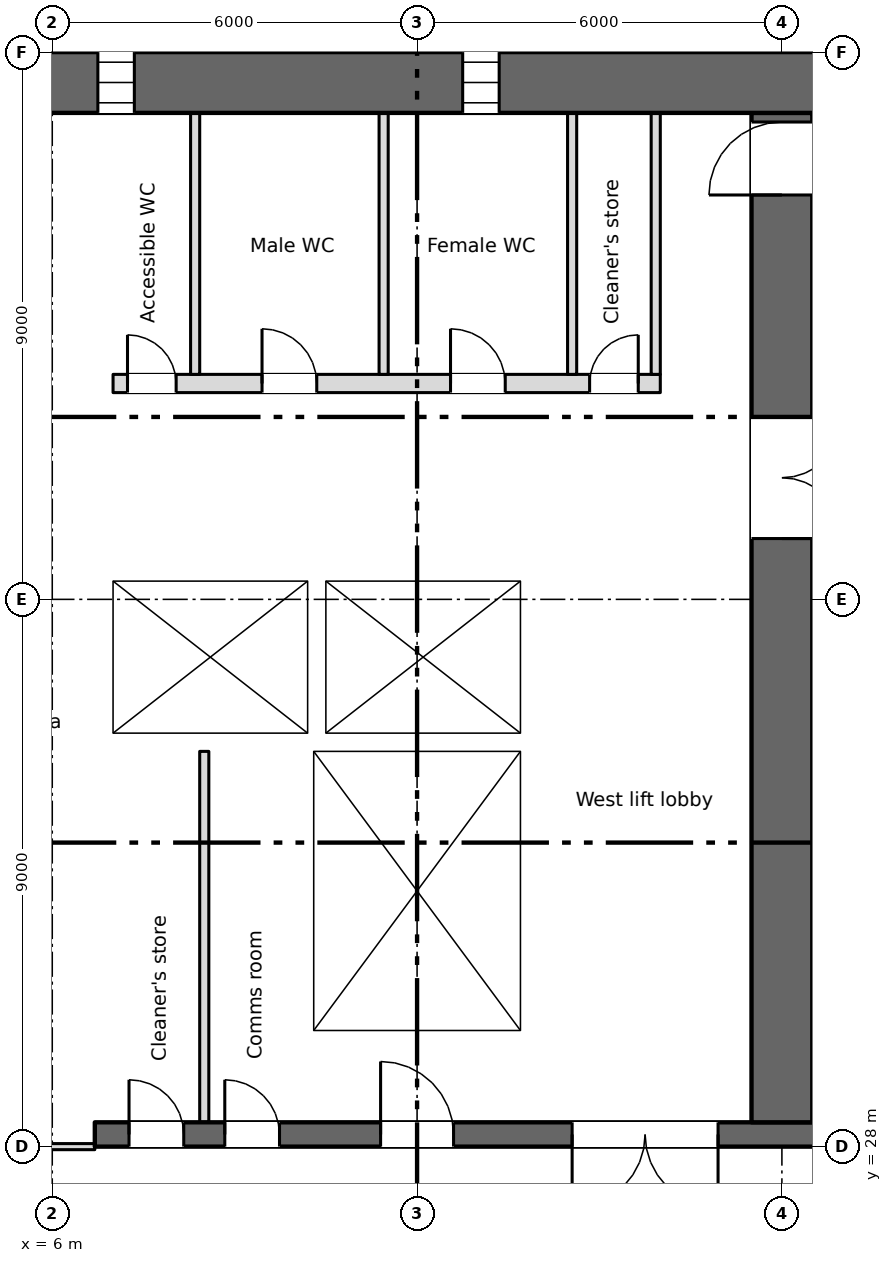
"""IFC4 building model, lengths in metres.
Left out: names, types, materials, properties, quantities, classifications, styles, units other than length and angle.
Written with IfcOpenShell. Run it as: python <this file> out.ifc"""

import sys

from ifc_helpers import new_model, si_unit, direction, frame, frame_2d, origin, place, context, subcontext, project, spatial, rectangle, extrude, element, fill, save


model = new_model("IFC4")
c1 = context("Model", 3, precision=1e-05, world=origin(), true_north=direction((0.0, 1.0)))
c2 = subcontext(c1, "Body", "Model", "MODEL_VIEW")
j1 = project(units=[si_unit("LENGTHUNIT", "METRE"), si_unit("PLANEANGLEUNIT", "RADIAN")], contexts=[c1])
p1 = place(None, origin())
s1 = spatial("IfcSite", under=j1, at=p1, CompositionType="ELEMENT")
p2 = place(p1, origin())
s2 = spatial("IfcBuilding", under=s1, at=p2, CompositionType="ELEMENT")
p3 = place(p2, frame((0.0, 0.0, 71.25)))
s3 = spatial("IfcBuildingStorey", under=s2, at=p3, CompositionType="ELEMENT", Elevation=71.25)
p4 = place(p3, frame((5.55, 45.5, 0.0), z_axis=(0.0, 0.0, 1.0), x_axis=(1.0, 0.0, 0.0)))
e1 = element("IfcWall", 1, at=p4, inside=s3, PredefinedType="SHEAR", context=c2, shape_type="SweptSolid", body=[
    extrude(rectangle(XDim=66.9, YDim=1.0, at=frame_2d((33.45, 0.0))), origin(), (0.0, 0.0, 1.0), 3.35),
])
p5 = place(p4, frame((1.2, 0.0, 0.6)))
e2 = element("IfcOpeningElement", 2, at=p5, cuts=e1, PredefinedType="OPENING", context=c2, shape_type="SweptSolid", body=[
    extrude(rectangle(XDim=0.6, YDim=2.4, at=frame_2d((0.3, 1.2))), frame((0.0, 0.51, 0.0), z_axis=(0.0, -1.0, 0.0), x_axis=(1.0, 0.0, 0.0)), (0.0, 0.0, 1.0), 1.02),
])
p6 = place(p4, frame((7.2, 0.0, 0.6)))
e3 = element("IfcOpeningElement", 3, at=p6, cuts=e1, PredefinedType="OPENING", context=c2, shape_type="SweptSolid", body=[
    extrude(rectangle(XDim=0.6, YDim=2.4, at=frame_2d((0.3, 1.2))), frame((0.0, 0.51, 0.0), z_axis=(0.0, -1.0, 0.0), x_axis=(1.0, 0.0, 0.0)), (0.0, 0.0, 1.0), 1.02),
])
p7 = place(p4, frame((61.2, 0.0, 0.6)))
e4 = element("IfcOpeningElement", 4, at=p7, cuts=e1, PredefinedType="OPENING", context=c2, shape_type="SweptSolid", body=[
    extrude(rectangle(XDim=0.6, YDim=2.4, at=frame_2d((0.3, 1.2))), frame((0.0, 0.51, 0.0), z_axis=(0.0, -1.0, 0.0), x_axis=(1.0, 0.0, 0.0)), (0.0, 0.0, 1.0), 1.02),
])
p8 = place(p3, frame((6.7, 28.2, 0.0), z_axis=(0.0, 0.0, 1.0), x_axis=(1.0, 0.0, 0.0)))
e5 = element("IfcWall", 5, at=p8, inside=s3, PredefinedType="SHEAR", context=c2, shape_type="SweptSolid", body=[
    extrude(rectangle(XDim=57.8, YDim=0.4, at=frame_2d((28.9, 0.0))), origin(), (0.0, 0.0, 1.0), 3.35),
])
p9 = place(p8, frame((12.562, 0.0, 0.0)))
e6 = element("IfcOpeningElement", 6, at=p9, cuts=e5, PredefinedType="OPENING", context=c2, shape_type="SweptSolid", body=[
    extrude(rectangle(XDim=0.9, YDim=2.1, at=frame_2d((0.45, 1.05))), frame((0.0, 0.21, 0.0), z_axis=(0.0, -1.0, 0.0), x_axis=(1.0, 0.0, 0.0)), (0.0, 0.0, 1.0), 0.42),
])
p10 = place(p8, frame((15.137, 0.0, 0.0)))
e7 = element("IfcOpeningElement", 7, at=p10, cuts=e5, PredefinedType="OPENING", context=c2, shape_type="SweptSolid", body=[
    extrude(rectangle(XDim=0.9, YDim=2.1, at=frame_2d((0.45, 1.05))), frame((0.0, 0.21, 0.0), z_axis=(0.0, -1.0, 0.0), x_axis=(1.0, 0.0, 0.0)), (0.0, 0.0, 1.0), 0.42),
])
p11 = place(p8, frame((49.85, 0.0, 0.0)))
e8 = element("IfcOpeningElement", 8, at=p11, cuts=e5, PredefinedType="OPENING", context=c2, shape_type="SweptSolid", body=[
    extrude(rectangle(XDim=0.9, YDim=2.1, at=frame_2d((0.45, 1.05))), frame((0.0, 0.21, 0.0), z_axis=(0.0, -1.0, 0.0), x_axis=(1.0, 0.0, 0.0)), (0.0, 0.0, 1.0), 0.42),
])
p12 = place(p8, frame((0.562, 0.0, 0.0)))
e9 = element("IfcOpeningElement", 9, at=p12, cuts=e5, PredefinedType="OPENING", context=c2, shape_type="SweptSolid", body=[
    extrude(rectangle(XDim=0.9, YDim=2.1, at=frame_2d((0.45, 1.05))), frame((0.0, 0.21, 0.0), z_axis=(0.0, -1.0, 0.0), x_axis=(1.0, 0.0, 0.0)), (0.0, 0.0, 1.0), 0.42),
])
p13 = place(p8, frame((2.137, 0.0, 0.0)))
e10 = element("IfcOpeningElement", 10, at=p13, cuts=e5, PredefinedType="OPENING", context=c2, shape_type="SweptSolid", body=[
    extrude(rectangle(XDim=0.9, YDim=2.1, at=frame_2d((0.45, 1.05))), frame((0.0, 0.21, 0.0), z_axis=(0.0, -1.0, 0.0), x_axis=(1.0, 0.0, 0.0)), (0.0, 0.0, 1.0), 0.42),
])
p14 = place(p8, frame((4.7, 0.0, 0.0)))
e11 = element("IfcOpeningElement", 11, at=p14, cuts=e5, PredefinedType="OPENING", context=c2, shape_type="SweptSolid", body=[
    extrude(rectangle(XDim=1.2, YDim=2.1, at=frame_2d((0.6, 1.05))), frame((0.0, 0.21, 0.0), z_axis=(0.0, -1.0, 0.0), x_axis=(1.0, 0.0, 0.0)), (0.0, 0.0, 1.0), 0.42),
])
p15 = place(p8, frame((31.7, 0.0, 0.0)))
e12 = element("IfcOpeningElement", 12, at=p15, cuts=e5, PredefinedType="OPENING", context=c2, shape_type="SweptSolid", body=[
    extrude(rectangle(XDim=1.2, YDim=2.1, at=frame_2d((0.6, 1.05))), frame((0.0, 0.21, 0.0), z_axis=(0.0, -1.0, 0.0), x_axis=(1.0, 0.0, 0.0)), (0.0, 0.0, 1.0), 0.42),
])
p16 = place(p8, frame((55.2, 0.0, 0.0)))
e13 = element("IfcOpeningElement", 13, at=p16, cuts=e5, PredefinedType="OPENING", context=c2, shape_type="SweptSolid", body=[
    extrude(rectangle(XDim=1.2, YDim=2.1, at=frame_2d((0.6, 1.05))), frame((0.0, 0.21, 0.0), z_axis=(0.0, -1.0, 0.0), x_axis=(1.0, 0.0, 0.0)), (0.0, 0.0, 1.0), 0.42),
])
p17 = place(p8, frame((21.7, 0.0, 0.0)))
e14 = element("IfcOpeningElement", 14, at=p17, cuts=e5, PredefinedType="OPENING", context=c2, shape_type="SweptSolid", body=[
    extrude(rectangle(XDim=1.2, YDim=2.1, at=frame_2d((0.6, 1.05))), frame((0.0, 0.21, 0.0), z_axis=(0.0, -1.0, 0.0), x_axis=(1.0, 0.0, 0.0)), (0.0, 0.0, 1.0), 0.42),
])
p18 = place(p8, frame((41.7, 0.0, 0.0)))
e15 = element("IfcOpeningElement", 15, at=p18, cuts=e5, PredefinedType="OPENING", context=c2, shape_type="SweptSolid", body=[
    extrude(rectangle(XDim=1.2, YDim=2.1, at=frame_2d((0.6, 1.05))), frame((0.0, 0.21, 0.0), z_axis=(0.0, -1.0, 0.0), x_axis=(1.0, 0.0, 0.0)), (0.0, 0.0, 1.0), 0.42),
])
p19 = place(p8, frame((24.85, 0.0, 0.0)))
e16 = element("IfcOpeningElement", 16, at=p19, cuts=e5, PredefinedType="OPENING", context=c2, shape_type="SweptSolid", body=[
    extrude(rectangle(XDim=2.4, YDim=2.1, at=frame_2d((1.2, 1.05))), frame((0.0, 0.21, 0.0), z_axis=(0.0, -1.0, 0.0), x_axis=(1.0, 0.0, 0.0)), (0.0, 0.0, 1.0), 0.42),
])
p20 = place(p8, frame((37.35, 0.0, 0.0)))
e17 = element("IfcOpeningElement", 17, at=p20, cuts=e5, PredefinedType="OPENING", context=c2, shape_type="SweptSolid", body=[
    extrude(rectangle(XDim=2.4, YDim=2.1, at=frame_2d((1.2, 1.05))), frame((0.0, 0.21, 0.0), z_axis=(0.0, -1.0, 0.0), x_axis=(1.0, 0.0, 0.0)), (0.0, 0.0, 1.0), 0.42),
])
p21 = place(p8, frame((7.85, 0.0, 0.0)))
e18 = element("IfcOpeningElement", 18, at=p21, cuts=e5, PredefinedType="OPENING", context=c2, shape_type="SweptSolid", body=[
    extrude(rectangle(XDim=2.4, YDim=2.1, at=frame_2d((1.2, 1.05))), frame((0.0, 0.21, 0.0), z_axis=(0.0, -1.0, 0.0), x_axis=(1.0, 0.0, 0.0)), (0.0, 0.0, 1.0), 0.42),
])
p22 = place(p8, frame((28.85, 0.0, 0.0)))
e19 = element("IfcOpeningElement", 19, at=p22, cuts=e5, PredefinedType="OPENING", context=c2, shape_type="SweptSolid", body=[
    extrude(rectangle(XDim=0.9, YDim=2.1, at=frame_2d((0.45, 1.05))), frame((0.0, 0.21, 0.0), z_axis=(0.0, -1.0, 0.0), x_axis=(1.0, 0.0, 0.0)), (0.0, 0.0, 1.0), 0.42),
])
p23 = place(p8, frame((34.85, 0.0, 0.0)))
e20 = element("IfcOpeningElement", 20, at=p23, cuts=e5, PredefinedType="OPENING", context=c2, shape_type="SweptSolid", body=[
    extrude(rectangle(XDim=0.9, YDim=2.1, at=frame_2d((0.45, 1.05))), frame((0.0, 0.21, 0.0), z_axis=(0.0, -1.0, 0.0), x_axis=(1.0, 0.0, 0.0)), (0.0, 0.0, 1.0), 0.42),
])
p24 = place(p3, frame((6.85, 28.4, 0.0), z_axis=(0.0, 0.0, 1.0), x_axis=(0.0, 1.0, 0.0)))
e21 = element("IfcWall", 21, at=p24, inside=s3, PredefinedType="SHEAR", context=c2, shape_type="SweptSolid", body=[
    extrude(rectangle(XDim=16.6, YDim=0.3, at=frame_2d((8.3, 0.0))), origin(), (0.0, 0.0, 1.0), 3.35),
])
p25 = place(p3, frame((18.0, 28.4, 0.0), z_axis=(0.0, 0.0, 1.0), x_axis=(0.0, 1.0, 0.0)))
e22 = element("IfcWall", 22, at=p25, inside=s3, PredefinedType="SHEAR", context=c2, shape_type="SweptSolid", body=[
    extrude(rectangle(XDim=16.6, YDim=1.0, at=frame_2d((8.3, 0.0))), origin(), (0.0, 0.0, 1.0), 3.35),
])
p26 = place(p25, frame((9.6, 0.0, 0.0)))
e23 = element("IfcOpeningElement", 23, at=p26, cuts=e22, PredefinedType="OPENING", context=c2, shape_type="SweptSolid", body=[
    extrude(rectangle(XDim=2.0, YDim=2.1, at=frame_2d((1.0, 1.05))), frame((0.0, 0.51, 0.0), z_axis=(0.0, -1.0, 0.0), x_axis=(1.0, 0.0, 0.0)), (0.0, 0.0, 1.0), 1.02),
])
p27 = place(p25, frame((15.25, 0.0, 0.0)))
e24 = element("IfcOpeningElement", 24, at=p27, cuts=e22, PredefinedType="OPENING", context=c2, shape_type="SweptSolid", body=[
    extrude(rectangle(XDim=1.2, YDim=2.1, at=frame_2d((0.6, 1.05))), frame((0.0, 0.51, 0.0), z_axis=(0.0, -1.0, 0.0), x_axis=(1.0, 0.0, 0.0)), (0.0, 0.0, 1.0), 1.02),
])
for number, where, z_axis, x_axis in (
    (25, (10.15, 28.4, 0.0), (0.0, 0.0, 1.0), (0.0, 1.0, 0.0)),
    (26, (13.85, 28.4, 0.0), (0.0, 0.0, 1.0), (0.0, 1.0, 0.0)),
):
    element("IfcWall", number, at=place(p3, frame(where, z_axis=z_axis, x_axis=x_axis)), inside=s3, PredefinedType="SHEAR", context=c2, shape_type="SweptSolid", body=[
        extrude(rectangle(XDim=6.1, YDim=0.3, at=frame_2d((3.05, 0.0))), origin(), (0.0, 0.0, 1.0), 3.35),
    ])
for number, where, z_axis, x_axis in (
    (27, (7.0, 34.65, 0.0), (0.0, 0.0, 1.0), (1.0, 0.0, 0.0)),
    (28, (7.0, 37.45, 0.0), (0.0, 0.0, 1.0), (1.0, 0.0, 0.0)),
):
    element("IfcWall", number, at=place(p3, frame(where, z_axis=z_axis, x_axis=x_axis)), inside=s3, PredefinedType="SHEAR", context=c2, shape_type="SweptSolid", body=[
        extrude(rectangle(XDim=7.0, YDim=0.3, at=frame_2d((3.5, 0.0))), origin(), (0.0, 0.0, 1.0), 3.35),
    ])
p28 = place(p3, frame((13.85, 34.8, 0.0), z_axis=(0.0, 0.0, 1.0), x_axis=(0.0, 1.0, 0.0)))
e29 = element("IfcWall", 29, at=p28, inside=s3, PredefinedType="SHEAR", context=c2, shape_type="SweptSolid", body=[
    extrude(rectangle(XDim=2.5, YDim=0.3, at=frame_2d((1.25, 0.0))), origin(), (0.0, 0.0, 1.0), 3.35),
])
p29 = place(p3, frame((7.0, 40.55, 0.0), z_axis=(0.0, 0.0, 1.0), x_axis=(1.0, 0.0, 0.0)))
e30 = element("IfcWall", 30, at=p29, inside=s3, PredefinedType="PARTITIONING", context=c2, shape_type="SweptSolid", body=[
    extrude(rectangle(XDim=9.0, YDim=0.3, at=frame_2d((4.5, 0.0))), origin(), (0.0, 0.0, 1.0), 3.35),
])
p30 = place(p29, frame((0.238, 0.0, 0.0)))
e31 = element("IfcOpeningElement", 31, at=p30, cuts=e30, PredefinedType="OPENING", context=c2, shape_type="SweptSolid", body=[
    extrude(rectangle(XDim=0.8, YDim=2.1, at=frame_2d((0.4, 1.05))), frame((0.0, 0.16, 0.0), z_axis=(0.0, -1.0, 0.0), x_axis=(1.0, 0.0, 0.0)), (0.0, 0.0, 1.0), 0.32),
])
p31 = place(p29, frame((2.45, 0.0, 0.0)))
e32 = element("IfcOpeningElement", 32, at=p31, cuts=e30, PredefinedType="OPENING", context=c2, shape_type="SweptSolid", body=[
    extrude(rectangle(XDim=0.9, YDim=2.1, at=frame_2d((0.45, 1.05))), frame((0.0, 0.16, 0.0), z_axis=(0.0, -1.0, 0.0), x_axis=(1.0, 0.0, 0.0)), (0.0, 0.0, 1.0), 0.32),
])
p32 = place(p29, frame((5.55, 0.0, 0.0)))
e33 = element("IfcOpeningElement", 33, at=p32, cuts=e30, PredefinedType="OPENING", context=c2, shape_type="SweptSolid", body=[
    extrude(rectangle(XDim=0.9, YDim=2.1, at=frame_2d((0.45, 1.05))), frame((0.0, 0.16, 0.0), z_axis=(0.0, -1.0, 0.0), x_axis=(1.0, 0.0, 0.0)), (0.0, 0.0, 1.0), 0.32),
])
p33 = place(p29, frame((7.837, 0.0, 0.0)))
e34 = element("IfcOpeningElement", 34, at=p33, cuts=e30, PredefinedType="OPENING", context=c2, shape_type="SweptSolid", body=[
    extrude(rectangle(XDim=0.8, YDim=2.1, at=frame_2d((0.4, 1.05))), frame((0.0, 0.16, 0.0), z_axis=(0.0, -1.0, 0.0), x_axis=(1.0, 0.0, 0.0)), (0.0, 0.0, 1.0), 0.32),
])
p34 = place(p3, frame((10.35, 34.8, 0.0), z_axis=(0.0, 0.0, 1.0), x_axis=(0.0, 1.0, 0.0)))
e35 = element("IfcWall", 35, at=p34, inside=s3, PredefinedType="SHEAR", context=c2, shape_type="SweptSolid", body=[
    extrude(rectangle(XDim=2.5, YDim=0.3, at=frame_2d((1.25, 0.0))), origin(), (0.0, 0.0, 1.0), 3.35),
])
p35 = place(p3, frame((15.925, 40.7, 0.0), z_axis=(0.0, 0.0, 1.0), x_axis=(0.0, 1.0, 0.0)))
e36 = element("IfcWall", 36, at=p35, inside=s3, PredefinedType="PARTITIONING", context=c2, shape_type="SweptSolid", body=[
    extrude(rectangle(XDim=4.3, YDim=0.15, at=frame_2d((2.15, 0.0))), origin(), (0.0, 0.0, 1.0), 3.35),
])
p36 = place(p3, frame((8.5, 28.4, 0.0), z_axis=(0.0, 0.0, 1.0), x_axis=(0.0, 1.0, 0.0)))
e37 = element("IfcWall", 37, at=p36, inside=s3, PredefinedType="PARTITIONING", context=c2, shape_type="SweptSolid", body=[
    extrude(rectangle(XDim=6.1, YDim=0.15, at=frame_2d((3.05, 0.0))), origin(), (0.0, 0.0, 1.0), 3.35),
])
for number, where, z_axis, x_axis in (
    (38, (8.35, 40.7, 0.0), (0.0, 0.0, 1.0), (0.0, 1.0, 0.0)),
    (39, (11.45, 40.7, 0.0), (0.0, 0.0, 1.0), (0.0, 1.0, 0.0)),
    (40, (14.55, 40.7, 0.0), (0.0, 0.0, 1.0), (0.0, 1.0, 0.0)),
):
    element("IfcWall", number, at=place(p3, frame(where, z_axis=z_axis, x_axis=x_axis)), inside=s3, PredefinedType="PARTITIONING", context=c2, shape_type="SweptSolid", body=[
        extrude(rectangle(XDim=4.3, YDim=0.15, at=frame_2d((2.15, 0.0))), origin(), (0.0, 0.0, 1.0), 3.35),
    ])
p37 = place(p3, frame((0.8, 28.0, 0.0), z_axis=(0.0, 0.0, 1.0), x_axis=(1.0, 0.0, 0.0)))
e41 = element("IfcWall", 41, at=p37, inside=s3, PredefinedType="PARTITIONING", context=c2, shape_type="SweptSolid", body=[
    extrude(rectangle(XDim=5.9, YDim=0.1, at=frame_2d((2.95, 0.0))), origin(), (0.0, 0.0, 1.0), 3.35),
])
p38 = place(p37, frame((2.05, 0.0, 0.0)))
e42 = element("IfcOpeningElement", 42, at=p38, cuts=e41, PredefinedType="OPENING", context=c2, shape_type="SweptSolid", body=[
    extrude(rectangle(XDim=1.8, YDim=2.1, at=frame_2d((0.9, 1.05))), frame((0.0, 0.06, 0.0), z_axis=(0.0, -1.0, 0.0), x_axis=(1.0, 0.0, 0.0)), (0.0, 0.0, 1.0), 0.12),
])
p39 = place(p5, origin())
e43 = element("IfcWindow", 43, at=p39, inside=s3, PartitioningType="SINGLE_PANEL", PredefinedType="WINDOW", context=c2, shape_type="SweptSolid", body=[
    extrude(rectangle(XDim=0.6, YDim=2.4, at=frame_2d((0.3, 1.2))), frame((0.0, 0.03, 0.0), z_axis=(0.0, -1.0, 0.0), x_axis=(1.0, 0.0, 0.0)), (0.0, 0.0, 1.0), 0.06),
])
fill(e2, e43)
p40 = place(p6, origin())
e44 = element("IfcWindow", 44, at=p40, inside=s3, PartitioningType="SINGLE_PANEL", PredefinedType="WINDOW", context=c2, shape_type="SweptSolid", body=[
    extrude(rectangle(XDim=0.6, YDim=2.4, at=frame_2d((0.3, 1.2))), frame((0.0, 0.03, 0.0), z_axis=(0.0, -1.0, 0.0), x_axis=(1.0, 0.0, 0.0)), (0.0, 0.0, 1.0), 0.06),
])
fill(e3, e44)
p41 = place(p12, origin())
e45 = element("IfcDoor", 45, at=p41, inside=s3, OperationType="SINGLE_SWING_LEFT", PredefinedType="DOOR", context=c2, shape_type="SweptSolid", body=[
    extrude(rectangle(XDim=0.9, YDim=2.1, at=frame_2d((0.45, 1.05))), frame((0.0, 0.025, 0.0), z_axis=(0.0, -1.0, 0.0), x_axis=(1.0, 0.0, 0.0)), (0.0, 0.0, 1.0), 0.05),
])
fill(e9, e45)
p42 = place(p13, origin())
e46 = element("IfcDoor", 46, at=p42, inside=s3, OperationType="SINGLE_SWING_LEFT", PredefinedType="DOOR", context=c2, shape_type="SweptSolid", body=[
    extrude(rectangle(XDim=0.9, YDim=2.1, at=frame_2d((0.45, 1.05))), frame((0.0, 0.025, 0.0), z_axis=(0.0, -1.0, 0.0), x_axis=(1.0, 0.0, 0.0)), (0.0, 0.0, 1.0), 0.05),
])
fill(e10, e46)
p43 = place(p30, origin())
e47 = element("IfcDoor", 47, at=p43, inside=s3, OperationType="SINGLE_SWING_LEFT", PredefinedType="DOOR", context=c2, shape_type="SweptSolid", body=[
    extrude(rectangle(XDim=0.8, YDim=2.1, at=frame_2d((0.4, 1.05))), frame((0.0, 0.025, 0.0), z_axis=(0.0, -1.0, 0.0), x_axis=(1.0, 0.0, 0.0)), (0.0, 0.0, 1.0), 0.05),
])
fill(e31, e47)
p44 = place(p31, origin())
e48 = element("IfcDoor", 48, at=p44, inside=s3, OperationType="SINGLE_SWING_LEFT", PredefinedType="DOOR", context=c2, shape_type="SweptSolid", body=[
    extrude(rectangle(XDim=0.9, YDim=2.1, at=frame_2d((0.45, 1.05))), frame((0.0, 0.025, 0.0), z_axis=(0.0, -1.0, 0.0), x_axis=(1.0, 0.0, 0.0)), (0.0, 0.0, 1.0), 0.05),
])
fill(e32, e48)
p45 = place(p32, origin())
e49 = element("IfcDoor", 49, at=p45, inside=s3, OperationType="SINGLE_SWING_LEFT", PredefinedType="DOOR", context=c2, shape_type="SweptSolid", body=[
    extrude(rectangle(XDim=0.9, YDim=2.1, at=frame_2d((0.45, 1.05))), frame((0.0, 0.025, 0.0), z_axis=(0.0, -1.0, 0.0), x_axis=(1.0, 0.0, 0.0)), (0.0, 0.0, 1.0), 0.05),
])
fill(e33, e49)
p46 = place(p33, origin())
e50 = element("IfcDoor", 50, at=p46, inside=s3, OperationType="SINGLE_SWING_RIGHT", PredefinedType="DOOR", context=c2, shape_type="SweptSolid", body=[
    extrude(rectangle(XDim=0.8, YDim=2.1, at=frame_2d((0.4, 1.05))), frame((0.0, 0.025, 0.0), z_axis=(0.0, -1.0, 0.0), x_axis=(1.0, 0.0, 0.0)), (0.0, 0.0, 1.0), 0.05),
])
fill(e34, e50)
p47 = place(p14, origin())
e51 = element("IfcDoor", 51, at=p47, inside=s3, OperationType="SINGLE_SWING_LEFT", PredefinedType="DOOR", context=c2, shape_type="SweptSolid", body=[
    extrude(rectangle(XDim=1.2, YDim=2.1, at=frame_2d((0.6, 1.05))), frame((0.0, 0.025, 0.0), z_axis=(0.0, -1.0, 0.0), x_axis=(1.0, 0.0, 0.0)), (0.0, 0.0, 1.0), 0.05),
])
fill(e11, e51)
p48 = place(p21, origin())
e52 = element("IfcDoor", 52, at=p48, inside=s3, OperationType="DOUBLE_DOOR_SINGLE_SWING", PredefinedType="DOOR", context=c2, shape_type="SweptSolid", body=[
    extrude(rectangle(XDim=2.4, YDim=2.1, at=frame_2d((1.2, 1.05))), frame((0.0, 0.025, 0.0), z_axis=(0.0, -1.0, 0.0), x_axis=(1.0, 0.0, 0.0)), (0.0, 0.0, 1.0), 0.05),
])
fill(e18, e52)
p49 = place(p26, origin())
e53 = element("IfcDoor", 53, at=p49, inside=s3, OperationType="DOUBLE_DOOR_SINGLE_SWING", PredefinedType="DOOR", context=c2, shape_type="SweptSolid", body=[
    extrude(rectangle(XDim=2.0, YDim=2.1, at=frame_2d((1.0, 1.05))), frame((0.0, 0.025, 0.0), z_axis=(0.0, -1.0, 0.0), x_axis=(1.0, 0.0, 0.0)), (0.0, 0.0, 1.0), 0.05),
])
fill(e23, e53)
p50 = place(p27, origin())
e54 = element("IfcDoor", 54, at=p50, inside=s3, OperationType="SINGLE_SWING_LEFT", PredefinedType="DOOR", context=c2, shape_type="SweptSolid", body=[
    extrude(rectangle(XDim=1.2, YDim=2.1, at=frame_2d((0.6, 1.05))), frame((0.0, 0.025, 0.0), z_axis=(0.0, -1.0, 0.0), x_axis=(1.0, 0.0, 0.0)), (0.0, 0.0, 1.0), 0.05),
])
fill(e24, e54)
save(model, sys.argv[1])
